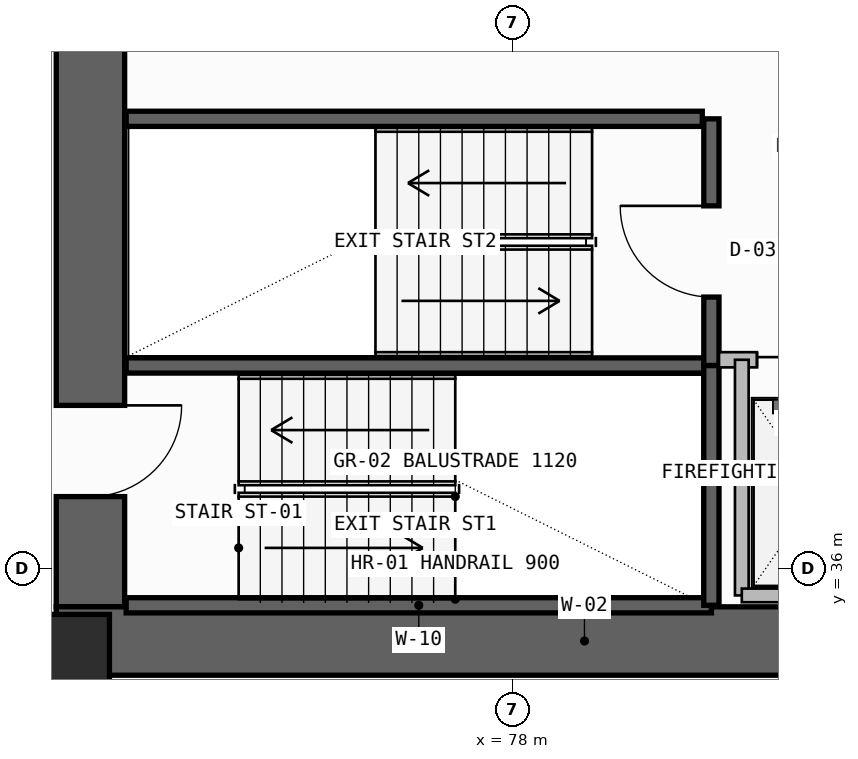
"""IFC4 building model, lengths in metres.
Left out: names, types, materials, properties, quantities, classifications, styles, units other than length and angle.
Written with IfcOpenShell. Run it as: python <this file> out.ifc"""

import sys

from ifc_helpers import new_model, si_unit, direction, frame, frame_2d, origin, origin_2d, place, context, subcontext, project, spatial, rectangle, extrude, element, fill, save


model = new_model("IFC4")
c1 = context("Model", 3, precision=1e-05, world=origin(), true_north=direction((0.0, 1.0)))
c2 = subcontext(c1, "Body", "Model", "MODEL_VIEW")
j1 = project(units=[si_unit("LENGTHUNIT", "METRE"), si_unit("PLANEANGLEUNIT", "RADIAN")], contexts=[c1])
p1 = place(None, origin())
s1 = spatial("IfcSite", under=j1, at=p1, CompositionType="ELEMENT")
p2 = place(p1, origin())
s2 = spatial("IfcBuilding", under=s1, at=p2, CompositionType="ELEMENT")
p3 = place(p2, frame((0.0, 0.0, 113.7)))
s3 = spatial("IfcBuildingStorey", under=s2, at=p3, CompositionType="ELEMENT", Elevation=113.7)
p4 = place(p3, frame((72.45, 35.5, -0.26), z_axis=(0.0, 0.0, 1.0), x_axis=(0.0, 1.0, 0.0)))
e1 = element("IfcWall", 1, at=p4, inside=s3, PredefinedType="SHEAR", context=c2, shape_type="SweptSolid", body=[
    extrude(rectangle(XDim=7.85, YDim=0.9, at=frame_2d((3.925, 0.0))), origin(), (0.0, 0.0, 1.0), 3.6),
])
p5 = place(p4, frame((1.45, 0.0, 0.26)))
e2 = element("IfcOpeningElement", 2, at=p5, cuts=e1, PredefinedType="OPENING", context=c2, shape_type="SweptSolid", body=[
    extrude(rectangle(XDim=1.2, YDim=2.2, at=frame_2d((0.6, 1.1))), frame((0.0, 0.46, 0.0), z_axis=(0.0, -1.0, 0.0), x_axis=(1.0, 0.0, 0.0)), (0.0, 0.0, 1.0), 0.92),
])
p6 = place(p3, frame((72.0, 35.05, -0.26), z_axis=(0.0, 0.0, 1.0), x_axis=(1.0, 0.0, 0.0)))
e3 = element("IfcWall", 3, at=p6, inside=s3, PredefinedType="SHEAR", context=c2, shape_type="SweptSolid", body=[
    extrude(rectangle(XDim=13.9, YDim=0.9, at=frame_2d((6.95, 0.0))), origin(), (0.0, 0.0, 1.0), 3.6),
])
p7 = place(p3, frame((72.0, 34.7, 0.0), z_axis=(0.0, 0.0, 1.0), x_axis=(1.0, 0.0, 0.0)))
e4 = element("IfcColumn", 4, at=p7, inside=s3, PredefinedType="COLUMN", context=c2, shape_type="SweptSolid", body=[
    extrude(rectangle(XDim=1.4, YDim=1.4, at=origin_2d()), origin(), (0.0, 0.0, 1.0), 3.6),
])
for number, where, z_axis, x_axis in (
    (5, (72.92, 35.52, -0.26), (0.0, 0.0, 1.0), (1.0, 0.0, 0.0)),
    (6, (72.92, 38.675, -0.26), (0.0, 0.0, 1.0), (1.0, 0.0, 0.0)),
):
    element("IfcWall", number, at=place(p3, frame(where, z_axis=z_axis, x_axis=x_axis)), inside=s3, PredefinedType="SOLIDWALL", context=c2, shape_type="SweptSolid", body=[
        extrude(rectangle(XDim=7.7, YDim=0.2, at=frame_2d((3.85, 0.0))), origin(), (0.0, 0.0, 1.0), 3.6),
    ])
p8 = place(p3, frame((80.62, 35.52, -0.26), z_axis=(0.0, 0.0, 1.0), x_axis=(0.0, 1.0, 0.0)))
e7 = element("IfcWall", 7, at=p8, inside=s3, PredefinedType="SOLIDWALL", context=c2, shape_type="SweptSolid", body=[
    extrude(rectangle(XDim=3.155, YDim=0.2, at=frame_2d((1.578, 0.0))), origin(), (0.0, 0.0, 1.0), 3.6),
])
p9 = place(p3, frame((80.62, 38.675, -0.26), z_axis=(0.0, 0.0, 1.0), x_axis=(0.0, 1.0, 0.0)))
e8 = element("IfcWall", 8, at=p9, inside=s3, PredefinedType="SOLIDWALL", context=c2, shape_type="SweptSolid", body=[
    extrude(rectangle(XDim=3.245, YDim=0.2, at=frame_2d((1.623, 0.0))), origin(), (0.0, 0.0, 1.0), 3.6),
])
p10 = place(p9, frame((0.9, 0.0, 0.26)))
e9 = element("IfcOpeningElement", 9, at=p10, cuts=e8, PredefinedType="OPENING", context=c2, shape_type="SweptSolid", body=[
    extrude(rectangle(XDim=1.2, YDim=2.2, at=frame_2d((0.6, 1.1))), frame((0.0, 0.11, 0.0), z_axis=(0.0, -1.0, 0.0), x_axis=(1.0, 0.0, 0.0)), (0.0, 0.0, 1.0), 0.22),
])
p11 = place(p3, frame((80.72, 38.75, 0.0), z_axis=(0.0, 0.0, 1.0), x_axis=(1.0, 0.0, 0.0)))
e10 = element("IfcWall", 10, at=p11, inside=s3, PredefinedType="SOLIDWALL", context=c2, shape_type="SweptSolid", body=[
    extrude(rectangle(XDim=4.26, YDim=0.2, at=frame_2d((2.13, 0.0))), origin(), (0.0, 0.0, 1.0), 3.34),
])
p12 = place(p11, frame((0.5, 0.0, 0.0)))
e11 = element("IfcOpeningElement", 11, at=p12, cuts=e10, PredefinedType="OPENING", context=c2, shape_type="SweptSolid", body=[
    extrude(rectangle(XDim=1.3, YDim=2.3, at=frame_2d((0.65, 1.15))), frame((0.0, 0.11, 0.0), z_axis=(0.0, -1.0, 0.0), x_axis=(1.0, 0.0, 0.0)), (0.0, 0.0, 1.0), 0.22),
])
p13 = place(p11, frame((2.45, 0.0, 0.0)))
e12 = element("IfcOpeningElement", 12, at=p13, cuts=e10, PredefinedType="OPENING", context=c2, shape_type="SweptSolid", body=[
    extrude(rectangle(XDim=1.3, YDim=2.3, at=frame_2d((0.65, 1.15))), frame((0.0, 0.11, 0.0), z_axis=(0.0, -1.0, 0.0), x_axis=(1.0, 0.0, 0.0)), (0.0, 0.0, 1.0), 0.22),
])
p14 = place(p3, frame((81.02, 35.65, 0.0), z_axis=(0.0, 0.0, 1.0), x_axis=(0.0, 1.0, 0.0)))
e13 = element("IfcWall", 13, at=p14, inside=s3, PredefinedType="SOLIDWALL", context=c2, shape_type="SweptSolid", body=[
    extrude(rectangle(XDim=3.1, YDim=0.18, at=frame_2d((1.55, 0.0))), origin(), (0.0, 0.0, 1.0), 3.34),
])
p15 = place(p3, frame((81.02, 35.65, 0.0), z_axis=(0.0, 0.0, 1.0), x_axis=(1.0, 0.0, 0.0)))
e14 = element("IfcWall", 14, at=p15, inside=s3, PredefinedType="SOLIDWALL", context=c2, shape_type="SweptSolid", body=[
    extrude(rectangle(XDim=3.93, YDim=0.18, at=frame_2d((1.965, 0.0))), origin(), (0.0, 0.0, 1.0), 3.34),
])
p16 = place(p3, frame((72.92, 41.92, -0.26), z_axis=(0.0, 0.0, 1.0), x_axis=(1.0, 0.0, 0.0)))
e15 = element("IfcWall", 15, at=p16, inside=s3, PredefinedType="SOLIDWALL", context=c2, shape_type="SweptSolid", body=[
    extrude(rectangle(XDim=7.58, YDim=0.2, at=frame_2d((3.79, 0.0))), origin(), (0.0, 0.0, 1.0), 3.6),
])
p17 = place(p5, frame((1.2, 0.0, 0.0), z_axis=(0.0, 0.0, 1.0), x_axis=(-1.0, 0.0, 0.0)))
e16 = element("IfcDoor", 16, at=p17, inside=s3, OperationType="SINGLE_SWING_LEFT", PredefinedType="USERDEFINED", context=c2, shape_type="SweptSolid", body=[
    extrude(rectangle(XDim=1.2, YDim=2.2, at=frame_2d((0.6, 1.1))), frame((0.0, 0.025, 0.0), z_axis=(0.0, -1.0, 0.0), x_axis=(1.0, 0.0, 0.0)), (0.0, 0.0, 1.0), 0.05),
])
fill(e2, e16)
p18 = place(p10, origin())
e17 = element("IfcDoor", 17, at=p18, inside=s3, OperationType="SINGLE_SWING_RIGHT", PredefinedType="USERDEFINED", context=c2, shape_type="SweptSolid", body=[
    extrude(rectangle(XDim=1.2, YDim=2.2, at=frame_2d((0.6, 1.1))), frame((0.0, 0.025, 0.0), z_axis=(0.0, -1.0, 0.0), x_axis=(1.0, 0.0, 0.0)), (0.0, 0.0, 1.0), 0.05),
])
fill(e9, e17)
p19 = place(p12, origin())
e18 = element("IfcDoor", 18, at=p19, inside=s3, OperationType="DOUBLE_DOOR_SLIDING", PredefinedType="DOOR", context=c2, shape_type="SweptSolid", body=[
    extrude(rectangle(XDim=1.3, YDim=2.3, at=frame_2d((0.65, 1.15))), frame((0.0, 0.025, 0.0), z_axis=(0.0, -1.0, 0.0), x_axis=(1.0, 0.0, 0.0)), (0.0, 0.0, 1.0), 0.05),
])
fill(e11, e18)
save(model, sys.argv[1])
